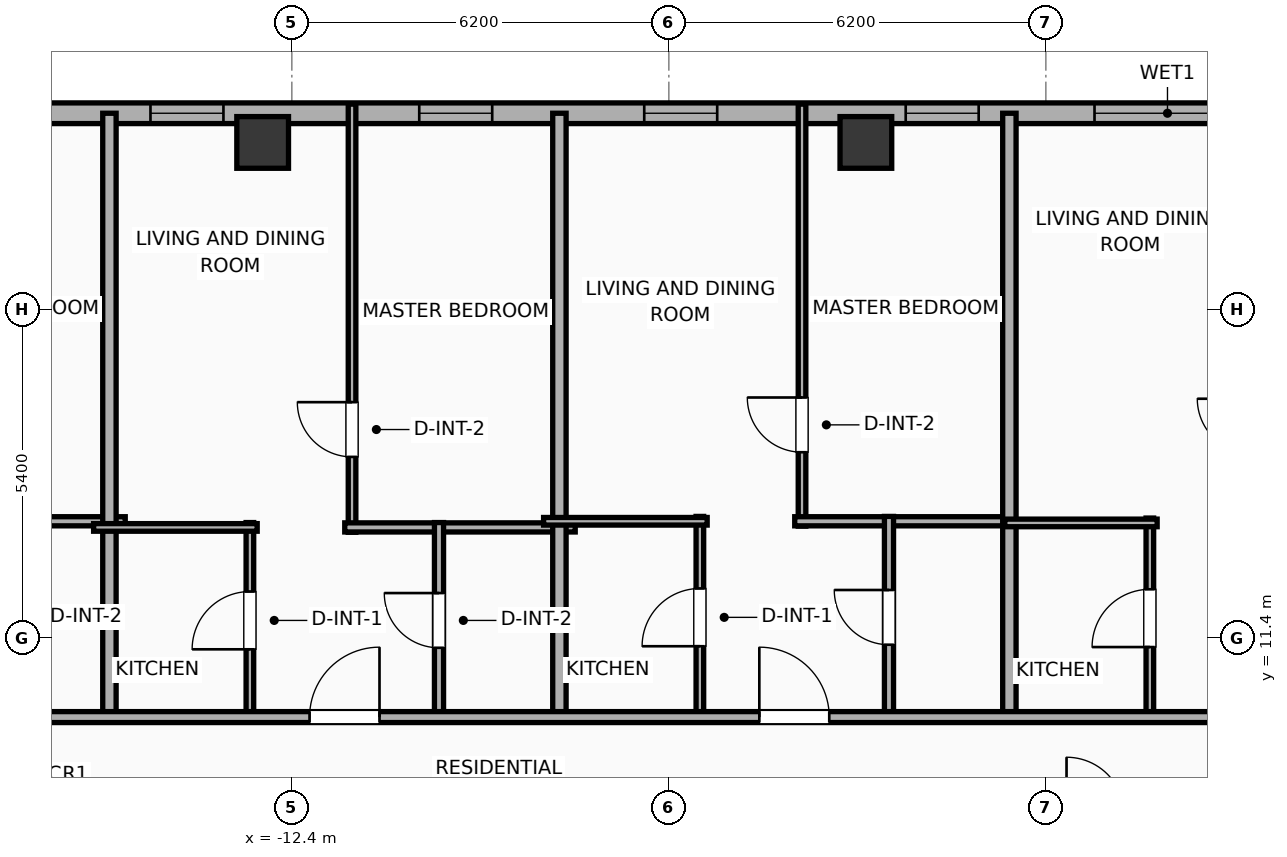
"""IFC4 building model, lengths in metres.
Left out: names, types, materials, properties, quantities, classifications, styles, units other than length and angle.
Written with IfcOpenShell. Run it as: python <this file> out.ifc"""

import sys

from ifc_helpers import new_model, si_unit, direction, frame, frame_2d, origin, origin_2d, place, context, subcontext, project, spatial, rectangle, hollow_rectangle, extrude, element, fill, save


model = new_model("IFC4")
c1 = context("Model", 3, precision=1e-05, world=origin(), true_north=direction((0.0, 1.0)))
c2 = subcontext(c1, "Body", "Model", "MODEL_VIEW")
j1 = project(units=[si_unit("LENGTHUNIT", "METRE"), si_unit("PLANEANGLEUNIT", "RADIAN")], contexts=[c1])
p1 = place(None, origin())
s1 = spatial("IfcSite", under=j1, at=p1, CompositionType="ELEMENT")
p2 = place(p1, origin())
s2 = spatial("IfcBuilding", under=s1, at=p2, CompositionType="ELEMENT")
p3 = place(p2, frame((0.0, 0.0, 235.3)))
s3 = spatial("IfcBuildingStorey", under=s2, at=p3, CompositionType="ELEMENT", Elevation=235.3)
for number, where, z_axis, x_axis in (
    (1, (-2.96, 19.55, 0.0), (0.0, 0.0, 1.0), (1.0, 0.0, 0.0)),
    (2, (-12.88, 19.55, 0.0), (0.0, 0.0, 1.0), (1.0, 0.0, 0.0)),
):
    element("IfcColumn", number, at=place(p3, frame(where, z_axis=z_axis, x_axis=x_axis)), inside=s3, PredefinedType="COLUMN", context=c2, shape_type="SweptSolid", body=[
        extrude(hollow_rectangle(XDim=0.85, YDim=0.85, WallThickness=0.028, at=origin_2d()), origin(), (0.0, 0.0, 1.0), 3.9),
    ])
p4 = place(p3, frame((-22.783, 20.03, 0.0), z_axis=(0.0, 0.0, 1.0), x_axis=(1.0, 0.0, 0.0)))
e3 = element("IfcWall", 3, at=p4, inside=s3, PredefinedType="ELEMENTEDWALL", context=c2, shape_type="SweptSolid", body=[
    extrude(rectangle(XDim=49.566, YDim=0.34, at=frame_2d((24.783, 0.0))), origin(), (0.0, 0.0, 1.0), 3.65),
])
p5 = place(p4, frame((23.583, 0.0, 0.75)))
e4 = element("IfcOpeningElement", 4, at=p5, cuts=e3, PredefinedType="OPENING", context=c2, shape_type="SweptSolid", body=[
    extrude(rectangle(XDim=2.4, YDim=2.1, at=frame_2d((1.2, 1.05))), frame((0.0, 0.18, 0.0), z_axis=(0.0, -1.0, 0.0), x_axis=(1.0, 0.0, 0.0)), (0.0, 0.0, 1.0), 0.36),
])
p6 = place(p4, frame((40.956, 0.0, 0.75)))
e5 = element("IfcOpeningElement", 5, at=p6, cuts=e3, PredefinedType="OPENING", context=c2, shape_type="SweptSolid", body=[
    extrude(rectangle(XDim=2.4, YDim=2.1, at=frame_2d((1.2, 1.05))), frame((0.0, 0.18, 0.0), z_axis=(0.0, -1.0, 0.0), x_axis=(1.0, 0.0, 0.0)), (0.0, 0.0, 1.0), 0.36),
])
p7 = place(p4, frame((5.078, 0.0, 0.75)))
e6 = element("IfcOpeningElement", 6, at=p7, cuts=e3, PredefinedType="OPENING", context=c2, shape_type="SweptSolid", body=[
    extrude(rectangle(XDim=1.2, YDim=2.05, at=frame_2d((0.6, 1.025))), frame((0.0, 0.18, 0.0), z_axis=(0.0, -1.0, 0.0), x_axis=(1.0, 0.0, 0.0)), (0.0, 0.0, 1.0), 0.36),
])
p8 = place(p4, frame((8.058, 0.0, 0.75)))
e7 = element("IfcOpeningElement", 7, at=p8, cuts=e3, PredefinedType="OPENING", context=c2, shape_type="SweptSolid", body=[
    extrude(rectangle(XDim=1.2, YDim=2.05, at=frame_2d((0.6, 1.025))), frame((0.0, 0.18, 0.0), z_axis=(0.0, -1.0, 0.0), x_axis=(1.0, 0.0, 0.0)), (0.0, 0.0, 1.0), 0.36),
])
p9 = place(p4, frame((12.478, 0.0, 0.75)))
e8 = element("IfcOpeningElement", 8, at=p9, cuts=e3, PredefinedType="OPENING", context=c2, shape_type="SweptSolid", body=[
    extrude(rectangle(XDim=1.2, YDim=2.05, at=frame_2d((0.6, 1.025))), frame((0.0, 0.18, 0.0), z_axis=(0.0, -1.0, 0.0), x_axis=(1.0, 0.0, 0.0)), (0.0, 0.0, 1.0), 0.36),
])
p10 = place(p4, frame((16.178, 0.0, 0.75)))
e9 = element("IfcOpeningElement", 9, at=p10, cuts=e3, PredefinedType="OPENING", context=c2, shape_type="SweptSolid", body=[
    extrude(rectangle(XDim=1.2, YDim=2.05, at=frame_2d((0.6, 1.025))), frame((0.0, 0.18, 0.0), z_axis=(0.0, -1.0, 0.0), x_axis=(1.0, 0.0, 0.0)), (0.0, 0.0, 1.0), 0.36),
])
p11 = place(p4, frame((20.478, 0.0, 0.75)))
e10 = element("IfcOpeningElement", 10, at=p11, cuts=e3, PredefinedType="OPENING", context=c2, shape_type="SweptSolid", body=[
    extrude(rectangle(XDim=1.2, YDim=2.05, at=frame_2d((0.6, 1.025))), frame((0.0, 0.18, 0.0), z_axis=(0.0, -1.0, 0.0), x_axis=(1.0, 0.0, 0.0)), (0.0, 0.0, 1.0), 0.36),
])
p12 = place(p4, frame((27.278, 0.0, 0.75)))
e11 = element("IfcOpeningElement", 11, at=p12, cuts=e3, PredefinedType="OPENING", context=c2, shape_type="SweptSolid", body=[
    extrude(rectangle(XDim=1.2, YDim=2.05, at=frame_2d((0.6, 1.025))), frame((0.0, 0.18, 0.0), z_axis=(0.0, -1.0, 0.0), x_axis=(1.0, 0.0, 0.0)), (0.0, 0.0, 1.0), 0.36),
])
p13 = place(p4, frame((30.978, 0.0, 0.75)))
e12 = element("IfcOpeningElement", 12, at=p13, cuts=e3, PredefinedType="OPENING", context=c2, shape_type="SweptSolid", body=[
    extrude(rectangle(XDim=1.2, YDim=2.05, at=frame_2d((0.6, 1.025))), frame((0.0, 0.18, 0.0), z_axis=(0.0, -1.0, 0.0), x_axis=(1.0, 0.0, 0.0)), (0.0, 0.0, 1.0), 0.36),
])
p14 = place(p4, frame((34.678, 0.0, 0.75)))
e13 = element("IfcOpeningElement", 13, at=p14, cuts=e3, PredefinedType="OPENING", context=c2, shape_type="SweptSolid", body=[
    extrude(rectangle(XDim=1.2, YDim=2.05, at=frame_2d((0.6, 1.025))), frame((0.0, 0.18, 0.0), z_axis=(0.0, -1.0, 0.0), x_axis=(1.0, 0.0, 0.0)), (0.0, 0.0, 1.0), 0.36),
])
p15 = place(p4, frame((37.798, 0.0, 0.75)))
e14 = element("IfcOpeningElement", 14, at=p15, cuts=e3, PredefinedType="OPENING", context=c2, shape_type="SweptSolid", body=[
    extrude(rectangle(XDim=1.2, YDim=2.05, at=frame_2d((0.6, 1.025))), frame((0.0, 0.18, 0.0), z_axis=(0.0, -1.0, 0.0), x_axis=(1.0, 0.0, 0.0)), (0.0, 0.0, 1.0), 0.36),
])
p16 = place(p4, frame((45.83, 0.0, 0.75)))
e15 = element("IfcOpeningElement", 15, at=p16, cuts=e3, PredefinedType="OPENING", context=c2, shape_type="SweptSolid", body=[
    extrude(rectangle(XDim=1.2, YDim=2.05, at=frame_2d((0.6, 1.025))), frame((0.0, 0.18, 0.0), z_axis=(0.0, -1.0, 0.0), x_axis=(1.0, 0.0, 0.0)), (0.0, 0.0, 1.0), 0.36),
])
p17 = place(p3, frame((-18.93, 13.32, 0.0), z_axis=(0.0, 0.0, 1.0), x_axis=(1.0, 0.0, 0.0)))
e16 = element("IfcWall", 16, at=p17, inside=s3, PredefinedType="PLUMBINGWALL", context=c2, shape_type="SweptSolid", body=[
    extrude(rectangle(XDim=3.79, YDim=0.15, at=frame_2d((1.895, 0.0))), origin(), (0.0, 0.0, 1.0), 3.65),
])
p18 = place(p3, frame((-15.4, 10.02, 0.0), z_axis=(0.0, 0.0, 1.0), x_axis=(0.0, 1.0, 0.0)))
e17 = element("IfcWall", 17, at=p18, inside=s3, PredefinedType="PARTITIONING", context=c2, shape_type="SweptSolid", body=[
    extrude(rectangle(XDim=10.01, YDim=0.22, at=frame_2d((5.005, 0.0))), origin(), (0.0, 0.0, 1.0), 3.65),
])
p19 = place(p3, frame((-11.41, 13.139, 0.0), z_axis=(0.0, 0.0, 1.0), x_axis=(0.0, 1.0, 0.0)))
e18 = element("IfcWall", 18, at=p19, inside=s3, PredefinedType="PARTITIONING", context=c2, shape_type="SweptSolid", body=[
    extrude(rectangle(XDim=7.041, YDim=0.125, at=frame_2d((3.521, 0.0))), origin(), (0.0, 0.0, 1.0), 3.65),
])
p20 = place(p19, frame((1.24, 0.0, 0.0)))
e19 = element("IfcOpeningElement", 19, at=p20, cuts=e18, PredefinedType="OPENING", context=c2, shape_type="SweptSolid", body=[
    extrude(rectangle(XDim=0.9, YDim=2.05, at=frame_2d((0.45, 1.025))), frame((0.0, 0.073, 0.0), z_axis=(0.0, -1.0, 0.0), x_axis=(1.0, 0.0, 0.0)), (0.0, 0.0, 1.0), 0.145),
])
p21 = place(p3, frame((-11.53, 13.219, 0.0), z_axis=(0.0, 0.0, 1.0), x_axis=(1.0, 0.0, 0.0)))
e20 = element("IfcWall", 20, at=p21, inside=s3, PredefinedType="PLUMBINGWALL", context=c2, shape_type="SweptSolid", body=[
    extrude(rectangle(XDim=3.79, YDim=0.15, at=frame_2d((1.895, 0.0))), origin(), (0.0, 0.0, 1.0), 3.65),
])
p22 = place(p3, frame((-13.09, 10.08, 0.0), z_axis=(0.0, 0.0, 1.0), x_axis=(0.0, 1.0, 0.0)))
e21 = element("IfcWall", 21, at=p22, inside=s3, PredefinedType="PARTITIONING", context=c2, shape_type="SweptSolid", body=[
    extrude(rectangle(XDim=3.219, YDim=0.125, at=frame_2d((1.609, 0.0))), origin(), (0.0, 0.0, 1.0), 3.65),
])
p23 = place(p22, frame((1.135, 0.0, 0.0)))
e22 = element("IfcOpeningElement", 22, at=p23, cuts=e21, PredefinedType="OPENING", context=c2, shape_type="SweptSolid", body=[
    extrude(rectangle(XDim=0.95, YDim=2.05, at=frame_2d((0.475, 1.025))), frame((0.0, 0.073, 0.0), z_axis=(0.0, -1.0, 0.0), x_axis=(1.0, 0.0, 0.0)), (0.0, 0.0, 1.0), 0.145),
])
p24 = place(p3, frame((-15.66, 13.219, 0.0), z_axis=(0.0, 0.0, 1.0), x_axis=(1.0, 0.0, 0.0)))
e23 = element("IfcWall", 23, at=p24, inside=s3, PredefinedType="PARTITIONING", context=c2, shape_type="SweptSolid", body=[
    extrude(rectangle(XDim=2.69, YDim=0.125, at=frame_2d((1.345, 0.0))), origin(), (0.0, 0.0, 1.0), 3.65),
])
p25 = place(p3, frame((-9.98, 10.08, 0.0), z_axis=(0.0, 0.0, 1.0), x_axis=(0.0, 1.0, 0.0)))
e24 = element("IfcWall", 24, at=p25, inside=s3, PredefinedType="PLUMBINGWALL", context=c2, shape_type="SweptSolid", body=[
    extrude(rectangle(XDim=3.219, YDim=0.15, at=frame_2d((1.609, 0.0))), origin(), (0.0, 0.0, 1.0), 3.65),
])
p26 = place(p25, frame((1.159, 0.0, 0.0)))
e25 = element("IfcOpeningElement", 25, at=p26, cuts=e24, PredefinedType="OPENING", context=c2, shape_type="SweptSolid", body=[
    extrude(rectangle(XDim=0.9, YDim=2.05, at=frame_2d((0.45, 1.025))), frame((0.0, 0.085, 0.0), z_axis=(0.0, -1.0, 0.0), x_axis=(1.0, 0.0, 0.0)), (0.0, 0.0, 1.0), 0.17),
])
p27 = place(p3, frame((-8.0, 10.02, 0.0), z_axis=(0.0, 0.0, 1.0), x_axis=(0.0, 1.0, 0.0)))
e26 = element("IfcWall", 26, at=p27, inside=s3, PredefinedType="PARTITIONING", context=c2, shape_type="SweptSolid", body=[
    extrude(rectangle(XDim=10.01, YDim=0.22, at=frame_2d((5.005, 0.0))), origin(), (0.0, 0.0, 1.0), 3.65),
])
p28 = place(p3, frame((-4.01, 13.24, 0.0), z_axis=(0.0, 0.0, 1.0), x_axis=(0.0, 1.0, 0.0)))
e27 = element("IfcWall", 27, at=p28, inside=s3, PredefinedType="PARTITIONING", context=c2, shape_type="SweptSolid", body=[
    extrude(rectangle(XDim=6.94, YDim=0.125, at=frame_2d((3.47, 0.0))), origin(), (0.0, 0.0, 1.0), 3.65),
])
p29 = place(p28, frame((1.216, 0.0, 0.0)))
e28 = element("IfcOpeningElement", 28, at=p29, cuts=e27, PredefinedType="OPENING", context=c2, shape_type="SweptSolid", body=[
    extrude(rectangle(XDim=0.9, YDim=2.05, at=frame_2d((0.45, 1.025))), frame((0.0, 0.073, 0.0), z_axis=(0.0, -1.0, 0.0), x_axis=(1.0, 0.0, 0.0)), (0.0, 0.0, 1.0), 0.145),
])
p30 = place(p3, frame((-4.13, 13.32, 0.0), z_axis=(0.0, 0.0, 1.0), x_axis=(1.0, 0.0, 0.0)))
e29 = element("IfcWall", 29, at=p30, inside=s3, PredefinedType="PLUMBINGWALL", context=c2, shape_type="SweptSolid", body=[
    extrude(rectangle(XDim=3.605, YDim=0.15, at=frame_2d((1.802, 0.0))), origin(), (0.0, 0.0, 1.0), 3.65),
])
p31 = place(p3, frame((-5.69, 10.08, 0.0), z_axis=(0.0, 0.0, 1.0), x_axis=(0.0, 1.0, 0.0)))
e30 = element("IfcWall", 30, at=p31, inside=s3, PredefinedType="PARTITIONING", context=c2, shape_type="SweptSolid", body=[
    extrude(rectangle(XDim=3.32, YDim=0.125, at=frame_2d((1.66, 0.0))), origin(), (0.0, 0.0, 1.0), 3.65),
])
p32 = place(p31, frame((1.185, 0.0, 0.0)))
e31 = element("IfcOpeningElement", 31, at=p32, cuts=e30, PredefinedType="OPENING", context=c2, shape_type="SweptSolid", body=[
    extrude(rectangle(XDim=0.95, YDim=2.05, at=frame_2d((0.475, 1.025))), frame((0.0, 0.073, 0.0), z_axis=(0.0, -1.0, 0.0), x_axis=(1.0, 0.0, 0.0)), (0.0, 0.0, 1.0), 0.145),
])
p33 = place(p3, frame((-8.26, 13.32, 0.0), z_axis=(0.0, 0.0, 1.0), x_axis=(1.0, 0.0, 0.0)))
e32 = element("IfcWall", 32, at=p33, inside=s3, PredefinedType="PARTITIONING", context=c2, shape_type="SweptSolid", body=[
    extrude(rectangle(XDim=2.69, YDim=0.125, at=frame_2d((1.345, 0.0))), origin(), (0.0, 0.0, 1.0), 3.65),
])
p34 = place(p3, frame((-2.58, 10.08, 0.0), z_axis=(0.0, 0.0, 1.0), x_axis=(0.0, 1.0, 0.0)))
e33 = element("IfcWall", 33, at=p34, inside=s3, PredefinedType="PLUMBINGWALL", context=c2, shape_type="SweptSolid", body=[
    extrude(rectangle(XDim=3.32, YDim=0.15, at=frame_2d((1.66, 0.0))), origin(), (0.0, 0.0, 1.0), 3.65),
])
p35 = place(p34, frame((1.21, 0.0, 0.0)))
e34 = element("IfcOpeningElement", 34, at=p35, cuts=e33, PredefinedType="OPENING", context=c2, shape_type="SweptSolid", body=[
    extrude(rectangle(XDim=0.9, YDim=2.05, at=frame_2d((0.45, 1.025))), frame((0.0, 0.085, 0.0), z_axis=(0.0, -1.0, 0.0), x_axis=(1.0, 0.0, 0.0)), (0.0, 0.0, 1.0), 0.17),
])
p36 = place(p3, frame((-0.6, 10.02, 0.0), z_axis=(0.0, 0.0, 1.0), x_axis=(0.0, 1.0, 0.0)))
e35 = element("IfcWall", 35, at=p36, inside=s3, PredefinedType="PARTITIONING", context=c2, shape_type="SweptSolid", body=[
    extrude(rectangle(XDim=10.01, YDim=0.22, at=frame_2d((5.005, 0.0))), origin(), (0.0, 0.0, 1.0), 3.65),
])
p37 = place(p3, frame((1.71, 10.08, 0.0), z_axis=(0.0, 0.0, 1.0), x_axis=(0.0, 1.0, 0.0)))
e36 = element("IfcWall", 36, at=p37, inside=s3, PredefinedType="PARTITIONING", context=c2, shape_type="SweptSolid", body=[
    extrude(rectangle(XDim=3.293, YDim=0.125, at=frame_2d((1.646, 0.0))), origin(), (0.0, 0.0, 1.0), 3.65),
])
p38 = place(p37, frame((1.171, 0.0, 0.0)))
e37 = element("IfcOpeningElement", 37, at=p38, cuts=e36, PredefinedType="OPENING", context=c2, shape_type="SweptSolid", body=[
    extrude(rectangle(XDim=0.95, YDim=2.05, at=frame_2d((0.475, 1.025))), frame((0.0, 0.073, 0.0), z_axis=(0.0, -1.0, 0.0), x_axis=(1.0, 0.0, 0.0)), (0.0, 0.0, 1.0), 0.145),
])
p39 = place(p3, frame((-0.675, 13.293, 0.0), z_axis=(0.0, 0.0, 1.0), x_axis=(1.0, 0.0, 0.0)))
e38 = element("IfcWall", 38, at=p39, inside=s3, PredefinedType="PARTITIONING", context=c2, shape_type="SweptSolid", body=[
    extrude(rectangle(XDim=2.505, YDim=0.125, at=frame_2d((1.252, 0.0))), origin(), (0.0, 0.0, 1.0), 3.65),
])
p40 = place(p3, frame((-26.23, 10.1, 0.0), z_axis=(0.0, 0.0, 1.0), x_axis=(1.0, 0.0, 0.0)))
e39 = element("IfcWall", 39, at=p40, inside=s3, PredefinedType="PARTITIONING", context=c2, shape_type="SweptSolid", body=[
    extrude(rectangle(XDim=56.46, YDim=0.18, at=frame_2d((28.23, 0.0))), origin(), (0.0, 0.0, 1.0), 3.65),
])
p41 = place(p40, frame((5.302, 0.0, 0.0)))
e40 = element("IfcOpeningElement", 40, at=p41, cuts=e39, PredefinedType="OPENING", context=c2, shape_type="SweptSolid", body=[
    extrude(rectangle(XDim=1.15, YDim=2.05, at=frame_2d((0.575, 1.025))), frame((0.0, 0.1, 0.0), z_axis=(0.0, -1.0, 0.0), x_axis=(1.0, 0.0, 0.0)), (0.0, 0.0, 1.0), 0.2),
])
p42 = place(p40, frame((14.122, 0.0, 0.0)))
e41 = element("IfcOpeningElement", 41, at=p42, cuts=e39, PredefinedType="OPENING", context=c2, shape_type="SweptSolid", body=[
    extrude(rectangle(XDim=1.15, YDim=2.05, at=frame_2d((0.575, 1.025))), frame((0.0, 0.1, 0.0), z_axis=(0.0, -1.0, 0.0), x_axis=(1.0, 0.0, 0.0)), (0.0, 0.0, 1.0), 0.2),
])
p43 = place(p40, frame((21.518, 0.0, 0.0)))
e42 = element("IfcOpeningElement", 42, at=p43, cuts=e39, PredefinedType="OPENING", context=c2, shape_type="SweptSolid", body=[
    extrude(rectangle(XDim=1.15, YDim=2.05, at=frame_2d((0.575, 1.025))), frame((0.0, 0.1, 0.0), z_axis=(0.0, -1.0, 0.0), x_axis=(1.0, 0.0, 0.0)), (0.0, 0.0, 1.0), 0.2),
])
p44 = place(p40, frame((28.92, 0.0, 0.0)))
e43 = element("IfcOpeningElement", 43, at=p44, cuts=e39, PredefinedType="OPENING", context=c2, shape_type="SweptSolid", body=[
    extrude(rectangle(XDim=1.15, YDim=2.05, at=frame_2d((0.575, 1.025))), frame((0.0, 0.1, 0.0), z_axis=(0.0, -1.0, 0.0), x_axis=(1.0, 0.0, 0.0)), (0.0, 0.0, 1.0), 0.2),
])
p45 = place(p40, frame((36.322, 0.0, 0.0)))
e44 = element("IfcOpeningElement", 44, at=p45, cuts=e39, PredefinedType="OPENING", context=c2, shape_type="SweptSolid", body=[
    extrude(rectangle(XDim=1.15, YDim=2.05, at=frame_2d((0.575, 1.025))), frame((0.0, 0.1, 0.0), z_axis=(0.0, -1.0, 0.0), x_axis=(1.0, 0.0, 0.0)), (0.0, 0.0, 1.0), 0.2),
])
p46 = place(p40, frame((43.622, 0.0, 0.0)))
e45 = element("IfcOpeningElement", 45, at=p46, cuts=e39, PredefinedType="OPENING", context=c2, shape_type="SweptSolid", body=[
    extrude(rectangle(XDim=1.15, YDim=2.05, at=frame_2d((0.575, 1.025))), frame((0.0, 0.1, 0.0), z_axis=(0.0, -1.0, 0.0), x_axis=(1.0, 0.0, 0.0)), (0.0, 0.0, 1.0), 0.2),
])
p47 = place(p40, frame((51.781, 0.0, 0.0)))
e46 = element("IfcOpeningElement", 46, at=p47, cuts=e39, PredefinedType="OPENING", context=c2, shape_type="SweptSolid", body=[
    extrude(rectangle(XDim=1.15, YDim=2.05, at=frame_2d((0.575, 1.025))), frame((0.0, 0.1, 0.0), z_axis=(0.0, -1.0, 0.0), x_axis=(1.0, 0.0, 0.0)), (0.0, 0.0, 1.0), 0.2),
])
p48 = place(p5, origin())
e47 = element("IfcWindow", 47, at=p48, inside=s3, PartitioningType="SINGLE_PANEL", PredefinedType="WINDOW", context=c2, shape_type="SweptSolid", body=[
    extrude(rectangle(XDim=2.4, YDim=2.1, at=frame_2d((1.2, 1.05))), frame((0.0, 0.03, 0.0), z_axis=(0.0, -1.0, 0.0), x_axis=(1.0, 0.0, 0.0)), (0.0, 0.0, 1.0), 0.06),
])
fill(e4, e47)
p49 = place(p8, origin())
e48 = element("IfcWindow", 48, at=p49, inside=s3, PartitioningType="SINGLE_PANEL", PredefinedType="WINDOW", context=c2, shape_type="SweptSolid", body=[
    extrude(rectangle(XDim=1.2, YDim=2.05, at=frame_2d((0.6, 1.025))), frame((0.0, 0.03, 0.0), z_axis=(0.0, -1.0, 0.0), x_axis=(1.0, 0.0, 0.0)), (0.0, 0.0, 1.0), 0.06),
])
fill(e7, e48)
p50 = place(p9, origin())
e49 = element("IfcWindow", 49, at=p50, inside=s3, PartitioningType="SINGLE_PANEL", PredefinedType="WINDOW", context=c2, shape_type="SweptSolid", body=[
    extrude(rectangle(XDim=1.2, YDim=2.05, at=frame_2d((0.6, 1.025))), frame((0.0, 0.03, 0.0), z_axis=(0.0, -1.0, 0.0), x_axis=(1.0, 0.0, 0.0)), (0.0, 0.0, 1.0), 0.06),
])
fill(e8, e49)
p51 = place(p10, origin())
e50 = element("IfcWindow", 50, at=p51, inside=s3, PartitioningType="SINGLE_PANEL", PredefinedType="WINDOW", context=c2, shape_type="SweptSolid", body=[
    extrude(rectangle(XDim=1.2, YDim=2.05, at=frame_2d((0.6, 1.025))), frame((0.0, 0.03, 0.0), z_axis=(0.0, -1.0, 0.0), x_axis=(1.0, 0.0, 0.0)), (0.0, 0.0, 1.0), 0.06),
])
fill(e9, e50)
p52 = place(p11, origin())
e51 = element("IfcWindow", 51, at=p52, inside=s3, PartitioningType="SINGLE_PANEL", PredefinedType="WINDOW", context=c2, shape_type="SweptSolid", body=[
    extrude(rectangle(XDim=1.2, YDim=2.05, at=frame_2d((0.6, 1.025))), frame((0.0, 0.03, 0.0), z_axis=(0.0, -1.0, 0.0), x_axis=(1.0, 0.0, 0.0)), (0.0, 0.0, 1.0), 0.06),
])
fill(e10, e51)
p53 = place(p20, origin())
e52 = element("IfcDoor", 52, at=p53, inside=s3, OperationType="SINGLE_SWING_RIGHT", PredefinedType="DOOR", context=c2, shape_type="SweptSolid", body=[
    extrude(rectangle(XDim=0.9, YDim=2.05, at=frame_2d((0.45, 1.025))), frame((0.0, 0.025, 0.0), z_axis=(0.0, -1.0, 0.0), x_axis=(1.0, 0.0, 0.0)), (0.0, 0.0, 1.0), 0.05),
])
fill(e19, e52)
p54 = place(p23, origin())
e53 = element("IfcDoor", 53, at=p54, inside=s3, OperationType="SINGLE_SWING_LEFT", PredefinedType="DOOR", context=c2, shape_type="SweptSolid", body=[
    extrude(rectangle(XDim=0.95, YDim=2.05, at=frame_2d((0.475, 1.025))), frame((0.0, 0.025, 0.0), z_axis=(0.0, -1.0, 0.0), x_axis=(1.0, 0.0, 0.0)), (0.0, 0.0, 1.0), 0.05),
])
fill(e22, e53)
p55 = place(p26, origin())
e54 = element("IfcDoor", 54, at=p55, inside=s3, OperationType="SINGLE_SWING_RIGHT", PredefinedType="DOOR", context=c2, shape_type="SweptSolid", body=[
    extrude(rectangle(XDim=0.9, YDim=2.05, at=frame_2d((0.45, 1.025))), frame((0.0, 0.025, 0.0), z_axis=(0.0, -1.0, 0.0), x_axis=(1.0, 0.0, 0.0)), (0.0, 0.0, 1.0), 0.05),
])
fill(e25, e54)
p56 = place(p29, origin())
e55 = element("IfcDoor", 55, at=p56, inside=s3, OperationType="SINGLE_SWING_RIGHT", PredefinedType="DOOR", context=c2, shape_type="SweptSolid", body=[
    extrude(rectangle(XDim=0.9, YDim=2.05, at=frame_2d((0.45, 1.025))), frame((0.0, 0.025, 0.0), z_axis=(0.0, -1.0, 0.0), x_axis=(1.0, 0.0, 0.0)), (0.0, 0.0, 1.0), 0.05),
])
fill(e28, e55)
p57 = place(p32, origin())
e56 = element("IfcDoor", 56, at=p57, inside=s3, OperationType="SINGLE_SWING_LEFT", PredefinedType="DOOR", context=c2, shape_type="SweptSolid", body=[
    extrude(rectangle(XDim=0.95, YDim=2.05, at=frame_2d((0.475, 1.025))), frame((0.0, 0.025, 0.0), z_axis=(0.0, -1.0, 0.0), x_axis=(1.0, 0.0, 0.0)), (0.0, 0.0, 1.0), 0.05),
])
fill(e31, e56)
p58 = place(p35, origin())
e57 = element("IfcDoor", 57, at=p58, inside=s3, OperationType="SINGLE_SWING_RIGHT", PredefinedType="DOOR", context=c2, shape_type="SweptSolid", body=[
    extrude(rectangle(XDim=0.9, YDim=2.05, at=frame_2d((0.45, 1.025))), frame((0.0, 0.025, 0.0), z_axis=(0.0, -1.0, 0.0), x_axis=(1.0, 0.0, 0.0)), (0.0, 0.0, 1.0), 0.05),
])
fill(e34, e57)
p59 = place(p38, origin())
e58 = element("IfcDoor", 58, at=p59, inside=s3, OperationType="SINGLE_SWING_LEFT", PredefinedType="DOOR", context=c2, shape_type="SweptSolid", body=[
    extrude(rectangle(XDim=0.95, YDim=2.05, at=frame_2d((0.475, 1.025))), frame((0.0, 0.025, 0.0), z_axis=(0.0, -1.0, 0.0), x_axis=(1.0, 0.0, 0.0)), (0.0, 0.0, 1.0), 0.05),
])
fill(e37, e58)
p60 = place(p42, origin())
e59 = element("IfcDoor", 59, at=p60, inside=s3, OperationType="SINGLE_SWING_RIGHT", PredefinedType="DOOR", context=c2, shape_type="SweptSolid", body=[
    extrude(rectangle(XDim=1.15, YDim=2.05, at=frame_2d((0.575, 1.025))), frame((0.0, 0.025, 0.0), z_axis=(0.0, -1.0, 0.0), x_axis=(1.0, 0.0, 0.0)), (0.0, 0.0, 1.0), 0.05),
])
fill(e41, e59)
p61 = place(p43, origin())
e60 = element("IfcDoor", 60, at=p61, inside=s3, OperationType="SINGLE_SWING_LEFT", PredefinedType="DOOR", context=c2, shape_type="SweptSolid", body=[
    extrude(rectangle(XDim=1.15, YDim=2.05, at=frame_2d((0.575, 1.025))), frame((0.0, 0.025, 0.0), z_axis=(0.0, -1.0, 0.0), x_axis=(1.0, 0.0, 0.0)), (0.0, 0.0, 1.0), 0.05),
])
fill(e42, e60)
save(model, sys.argv[1])
